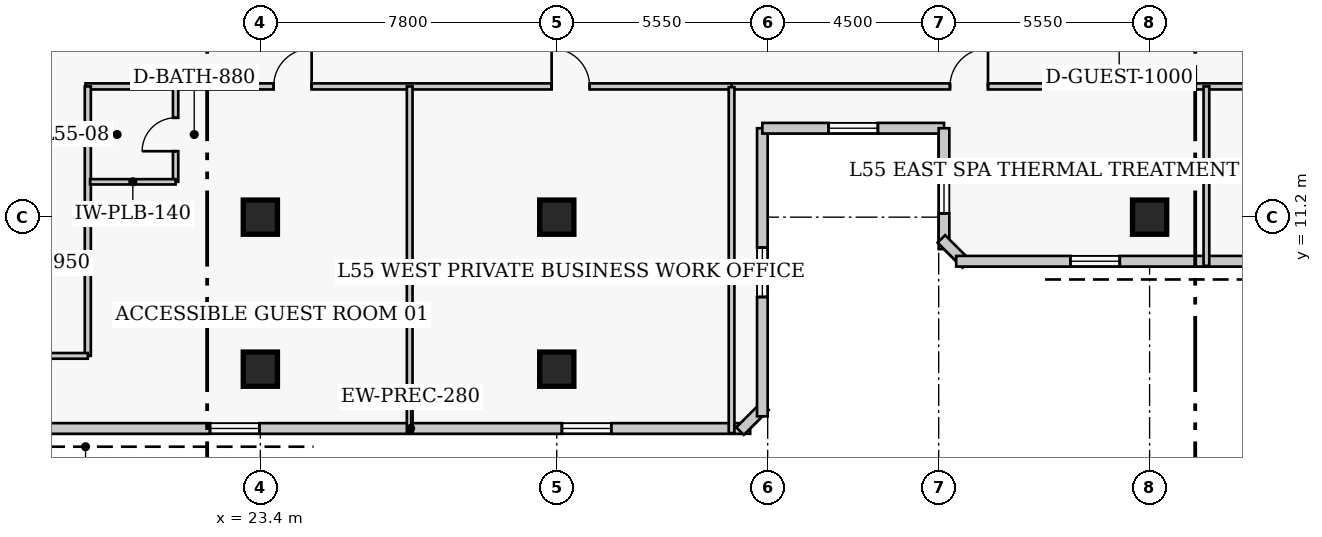
"""IFC4 building model, lengths in metres.
Left out: names, types, materials, properties, quantities, classifications, styles, units other than length and angle.
Written with IfcOpenShell. Run it as: python <this file> out.ifc"""

import sys

from ifc_helpers import new_model, si_unit, direction, frame, frame_2d, origin, origin_2d, place, context, subcontext, project, spatial, rectangle, extrude, element, fill, save


model = new_model("IFC4")
c1 = context("Model", 3, precision=1e-05, world=origin(), true_north=direction((0.0, 1.0)))
c2 = subcontext(c1, "Body", "Model", "MODEL_VIEW")
j1 = project(units=[si_unit("LENGTHUNIT", "METRE"), si_unit("PLANEANGLEUNIT", "RADIAN")], contexts=[c1])
p1 = place(None, origin())
s1 = spatial("IfcSite", under=j1, at=p1, CompositionType="ELEMENT")
p2 = place(p1, origin())
s2 = spatial("IfcBuilding", under=s1, at=p2, CompositionType="ELEMENT")
p3 = place(p2, frame((0.0, 0.0, 220.2)))
s3 = spatial("IfcBuildingStorey", under=s2, at=p3, CompositionType="ELEMENT", Elevation=220.2)
for number, where, z_axis, x_axis in (
    (1, (23.4, 11.2, 0.0), (0.0, 0.0, 1.0), (1.0, 0.0, 0.0)),
    (2, (31.2, 11.2, 0.0), (0.0, 0.0, 1.0), (1.0, 0.0, 0.0)),
    (3, (46.8, 11.2, 0.0), (0.0, 0.0, 1.0), (1.0, 0.0, 0.0)),
    (4, (23.4, 7.2, 0.0), (0.0, 0.0, 1.0), (1.0, 0.0, 0.0)),
    (5, (31.2, 7.2, 0.0), (0.0, 0.0, 1.0), (1.0, 0.0, 0.0)),
):
    element("IfcColumn", number, at=place(p3, frame(where, z_axis=z_axis, x_axis=x_axis)), inside=s3, PredefinedType="COLUMN", context=c2, shape_type="SweptSolid", body=[
        extrude(rectangle(XDim=0.9, YDim=0.9, at=origin_2d()), origin(), (0.0, 0.0, 1.0), 3.9),
    ])
p4 = place(p3, frame((10.46, 5.64, 0.0), z_axis=(0.0, 0.0, 1.0), x_axis=(1.0, 0.0, 0.0)))
e6 = element("IfcWall", 6, at=p4, inside=s3, PredefinedType="SOLIDWALL", context=c2, shape_type="SweptSolid", body=[
    extrude(rectangle(XDim=25.83, YDim=0.28, at=frame_2d((12.915, 0.0))), origin(), (0.0, 0.0, 1.0), 3.65),
])
p5 = place(p4, frame((4.305, 0.0, 0.85)))
e7 = element("IfcOpeningElement", 7, at=p5, cuts=e6, PredefinedType="OPENING", context=c2, shape_type="SweptSolid", body=[
    extrude(rectangle(XDim=1.3, YDim=1.7, at=frame_2d((0.65, 0.85))), frame((0.0, 0.15, 0.0), z_axis=(0.0, -1.0, 0.0), x_axis=(1.0, 0.0, 0.0)), (0.0, 0.0, 1.0), 0.3),
])
p6 = place(p4, frame((11.615, 0.0, 0.85)))
e8 = element("IfcOpeningElement", 8, at=p6, cuts=e6, PredefinedType="OPENING", context=c2, shape_type="SweptSolid", body=[
    extrude(rectangle(XDim=1.3, YDim=1.7, at=frame_2d((0.65, 0.85))), frame((0.0, 0.15, 0.0), z_axis=(0.0, -1.0, 0.0), x_axis=(1.0, 0.0, 0.0)), (0.0, 0.0, 1.0), 0.3),
])
p7 = place(p4, frame((20.875, 0.0, 0.85)))
e9 = element("IfcOpeningElement", 9, at=p7, cuts=e6, PredefinedType="OPENING", context=c2, shape_type="SweptSolid", body=[
    extrude(rectangle(XDim=1.3, YDim=1.7, at=frame_2d((0.65, 0.85))), frame((0.0, 0.15, 0.0), z_axis=(0.0, -1.0, 0.0), x_axis=(1.0, 0.0, 0.0)), (0.0, 0.0, 1.0), 0.3),
])
p8 = place(p3, frame((36.023, 5.571, 0.0), z_axis=(0.0, 0.0, 1.0), x_axis=(0.707106781187, 0.707106781187, 0.0)))
e10 = element("IfcWall", 10, at=p8, inside=s3, PredefinedType="SOLIDWALL", context=c2, shape_type="SweptSolid", body=[
    extrude(rectangle(XDim=0.928, YDim=0.28, at=frame_2d((0.464, 0.0))), origin(), (0.0, 0.0, 1.0), 3.65),
])
p9 = place(p3, frame((36.61, 5.96, 0.0), z_axis=(0.0, 0.0, 1.0), x_axis=(0.0, 1.0, 0.0)))
e11 = element("IfcWall", 11, at=p9, inside=s3, PredefinedType="SOLIDWALL", context=c2, shape_type="SweptSolid", body=[
    extrude(rectangle(XDim=7.58, YDim=0.28, at=frame_2d((3.79, 0.0))), origin(), (0.0, 0.0, 1.0), 3.65),
])
p10 = place(p9, frame((3.14, 0.0, 0.85)))
e12 = element("IfcOpeningElement", 12, at=p10, cuts=e11, PredefinedType="OPENING", context=c2, shape_type="SweptSolid", body=[
    extrude(rectangle(XDim=1.3, YDim=1.7, at=frame_2d((0.65, 0.85))), frame((0.0, 0.15, 0.0), z_axis=(0.0, -1.0, 0.0), x_axis=(1.0, 0.0, 0.0)), (0.0, 0.0, 1.0), 0.3),
])
p11 = place(p3, frame((36.61, 13.54, 0.0), z_axis=(0.0, 0.0, 1.0), x_axis=(1.0, 0.0, 0.0)))
e13 = element("IfcWall", 13, at=p11, inside=s3, PredefinedType="SOLIDWALL", context=c2, shape_type="SweptSolid", body=[
    extrude(rectangle(XDim=4.78, YDim=0.28, at=frame_2d((2.39, 0.0))), origin(), (0.0, 0.0, 1.0), 3.65),
])
p12 = place(p11, frame((1.74, 0.0, 0.85)))
e14 = element("IfcOpeningElement", 14, at=p12, cuts=e13, PredefinedType="OPENING", context=c2, shape_type="SweptSolid", body=[
    extrude(rectangle(XDim=1.3, YDim=1.7, at=frame_2d((0.65, 0.85))), frame((0.0, 0.15, 0.0), z_axis=(0.0, -1.0, 0.0), x_axis=(1.0, 0.0, 0.0)), (0.0, 0.0, 1.0), 0.3),
])
p13 = place(p3, frame((41.39, 13.54, 0.0), z_axis=(0.0, 0.0, 1.0), x_axis=(0.0, -1.0, 0.0)))
e15 = element("IfcWall", 15, at=p13, inside=s3, PredefinedType="SOLIDWALL", context=c2, shape_type="SweptSolid", body=[
    extrude(rectangle(XDim=3.18, YDim=0.28, at=frame_2d((1.59, 0.0))), origin(), (0.0, 0.0, 1.0), 3.65),
])
p14 = place(p13, frame((0.94, 0.0, 0.85)))
e16 = element("IfcOpeningElement", 16, at=p14, cuts=e15, PredefinedType="OPENING", context=c2, shape_type="SweptSolid", body=[
    extrude(rectangle(XDim=1.3, YDim=1.7, at=frame_2d((0.65, 0.85))), frame((0.0, 0.15, 0.0), z_axis=(0.0, -1.0, 0.0), x_axis=(1.0, 0.0, 0.0)), (0.0, 0.0, 1.0), 0.3),
])
p15 = place(p3, frame((41.321, 10.627, 0.0), z_axis=(0.0, 0.0, 1.0), x_axis=(0.707106781187, -0.707106781187, 0.0)))
e17 = element("IfcWall", 17, at=p15, inside=s3, PredefinedType="SOLIDWALL", context=c2, shape_type="SweptSolid", body=[
    extrude(rectangle(XDim=0.928, YDim=0.28, at=frame_2d((0.464, 0.0))), origin(), (0.0, 0.0, 1.0), 3.65),
])
p16 = place(p3, frame((41.71, 10.04, 0.0), z_axis=(0.0, 0.0, 1.0), x_axis=(1.0, 0.0, 0.0)))
e18 = element("IfcWall", 18, at=p16, inside=s3, PredefinedType="SOLIDWALL", context=c2, shape_type="SweptSolid", body=[
    extrude(rectangle(XDim=25.83, YDim=0.28, at=frame_2d((12.915, 0.0))), origin(), (0.0, 0.0, 1.0), 3.65),
])
p17 = place(p16, frame((3.005, 0.0, 0.85)))
e19 = element("IfcOpeningElement", 19, at=p17, cuts=e18, PredefinedType="OPENING", context=c2, shape_type="SweptSolid", body=[
    extrude(rectangle(XDim=1.3, YDim=1.7, at=frame_2d((0.65, 0.85))), frame((0.0, 0.15, 0.0), z_axis=(0.0, -1.0, 0.0), x_axis=(1.0, 0.0, 0.0)), (0.0, 0.0, 1.0), 0.3),
])
p18 = place(p16, frame((13.415, 0.0, 0.85)))
e20 = element("IfcOpeningElement", 20, at=p18, cuts=e18, PredefinedType="OPENING", context=c2, shape_type="SweptSolid", body=[
    extrude(rectangle(XDim=1.3, YDim=1.7, at=frame_2d((0.65, 0.85))), frame((0.0, 0.15, 0.0), z_axis=(0.0, -1.0, 0.0), x_axis=(1.0, 0.0, 0.0)), (0.0, 0.0, 1.0), 0.3),
])
p19 = place(p16, frame((21.525, 0.0, 0.85)))
e21 = element("IfcOpeningElement", 21, at=p19, cuts=e18, PredefinedType="OPENING", context=c2, shape_type="SweptSolid", body=[
    extrude(rectangle(XDim=1.3, YDim=1.7, at=frame_2d((0.65, 0.85))), frame((0.0, 0.15, 0.0), z_axis=(0.0, -1.0, 0.0), x_axis=(1.0, 0.0, 0.0)), (0.0, 0.0, 1.0), 0.3),
])
p20 = place(p3, frame((18.8, 14.64, 0.0), z_axis=(0.0, 0.0, 1.0), x_axis=(1.0, 0.0, 0.0)))
e22 = element("IfcWall", 22, at=p20, inside=s3, PredefinedType="PARTITIONING", context=c2, shape_type="SweptSolid", body=[
    extrude(rectangle(XDim=17.0, YDim=0.16, at=frame_2d((8.5, 0.0))), origin(), (0.0, 0.0, 1.0), 3.65),
])
p21 = place(p20, frame((4.95, 0.0, 0.0)))
e23 = element("IfcOpeningElement", 23, at=p21, cuts=e22, PredefinedType="OPENING", context=c2, shape_type="SweptSolid", body=[
    extrude(rectangle(XDim=1.0, YDim=2.15, at=frame_2d((0.5, 1.075))), frame((0.0, 0.09, 0.0), z_axis=(0.0, -1.0, 0.0), x_axis=(1.0, 0.0, 0.0)), (0.0, 0.0, 1.0), 0.18),
])
p22 = place(p20, frame((12.265, 0.0, 0.0)))
e24 = element("IfcOpeningElement", 24, at=p22, cuts=e22, PredefinedType="OPENING", context=c2, shape_type="SweptSolid", body=[
    extrude(rectangle(XDim=1.0, YDim=2.15, at=frame_2d((0.5, 1.075))), frame((0.0, 0.09, 0.0), z_axis=(0.0, -1.0, 0.0), x_axis=(1.0, 0.0, 0.0)), (0.0, 0.0, 1.0), 0.18),
])
p23 = place(p3, frame((35.8, 14.64, 0.0), z_axis=(0.0, 0.0, 1.0), x_axis=(1.0, 0.0, 0.0)))
e25 = element("IfcWall", 25, at=p23, inside=s3, PredefinedType="PARTITIONING", context=c2, shape_type="SweptSolid", body=[
    extrude(rectangle(XDim=22.85, YDim=0.16, at=frame_2d((11.425, 0.0))), origin(), (0.0, 0.0, 1.0), 3.65),
])
p24 = place(p23, frame((5.748, 0.0, 0.0)))
e26 = element("IfcOpeningElement", 26, at=p24, cuts=e25, PredefinedType="OPENING", context=c2, shape_type="SweptSolid", body=[
    extrude(rectangle(XDim=1.0, YDim=2.15, at=frame_2d((0.5, 1.075))), frame((0.0, 0.09, 0.0), z_axis=(0.0, -1.0, 0.0), x_axis=(1.0, 0.0, 0.0)), (0.0, 0.0, 1.0), 0.18),
])
p25 = place(p3, frame((18.86, 7.55, 0.0), z_axis=(0.0, 0.0, 1.0), x_axis=(0.0, 1.0, 0.0)))
e27 = element("IfcWall", 27, at=p25, inside=s3, PredefinedType="PARTITIONING", context=c2, shape_type="SweptSolid", body=[
    extrude(rectangle(XDim=7.09, YDim=0.16, at=frame_2d((3.545, 0.0))), origin(), (0.0, 0.0, 1.0), 3.65),
])
p26 = place(p3, frame((16.64, 7.55, 0.0), z_axis=(0.0, 0.0, 1.0), x_axis=(1.0, 0.0, 0.0)))
e28 = element("IfcWall", 28, at=p26, inside=s3, PredefinedType="PARTITIONING", context=c2, shape_type="SweptSolid", body=[
    extrude(rectangle(XDim=2.22, YDim=0.15, at=frame_2d((1.11, 0.0))), origin(), (0.0, 0.0, 1.0), 3.65),
])
p27 = place(p3, frame((21.17, 12.13, 0.0), z_axis=(0.0, 0.0, 1.0), x_axis=(0.0, 1.0, 0.0)))
e29 = element("IfcWall", 29, at=p27, inside=s3, PredefinedType="PLUMBINGWALL", context=c2, shape_type="SweptSolid", body=[
    extrude(rectangle(XDim=2.49, YDim=0.14, at=frame_2d((1.245, 0.0))), origin(), (0.0, 0.0, 1.0), 3.65),
])
p28 = place(p27, frame((0.805, 0.0, 0.0)))
e30 = element("IfcOpeningElement", 30, at=p28, cuts=e29, PredefinedType="OPENING", context=c2, shape_type="SweptSolid", body=[
    extrude(rectangle(XDim=0.88, YDim=2.05, at=frame_2d((0.44, 1.025))), frame((0.0, 0.08, 0.0), z_axis=(0.0, -1.0, 0.0), x_axis=(1.0, 0.0, 0.0)), (0.0, 0.0, 1.0), 0.16),
])
p29 = place(p3, frame((18.92, 12.13, 0.0), z_axis=(0.0, 0.0, 1.0), x_axis=(1.0, 0.0, 0.0)))
e31 = element("IfcWall", 31, at=p29, inside=s3, PredefinedType="PLUMBINGWALL", context=c2, shape_type="SweptSolid", body=[
    extrude(rectangle(XDim=2.25, YDim=0.14, at=frame_2d((1.125, 0.0))), origin(), (0.0, 0.0, 1.0), 3.65),
])
p30 = place(p3, frame((27.33, 5.52, 0.0), z_axis=(0.0, 0.0, 1.0), x_axis=(0.0, 1.0, 0.0)))
e32 = element("IfcWall", 32, at=p30, inside=s3, PredefinedType="PARTITIONING", context=c2, shape_type="SweptSolid", body=[
    extrude(rectangle(XDim=9.12, YDim=0.15, at=frame_2d((4.56, 0.0))), origin(), (0.0, 0.0, 1.0), 3.246),
])
p31 = place(p3, frame((35.8, 5.52, 0.0), z_axis=(0.0, 0.0, 1.0), x_axis=(0.0, 1.0, 0.0)))
e33 = element("IfcWall", 33, at=p31, inside=s3, PredefinedType="PARTITIONING", context=c2, shape_type="SweptSolid", body=[
    extrude(rectangle(XDim=9.1, YDim=0.15, at=frame_2d((4.55, 0.0))), origin(), (0.0, 0.0, 1.0), 3.65),
])
p32 = place(p3, frame((48.295, 9.92, 0.0), z_axis=(0.0, 0.0, 1.0), x_axis=(0.0, 1.0, 0.0)))
e34 = element("IfcWall", 34, at=p32, inside=s3, PredefinedType="PARTITIONING", context=c2, shape_type="SweptSolid", body=[
    extrude(rectangle(XDim=4.72, YDim=0.15, at=frame_2d((2.36, 0.0))), origin(), (0.0, 0.0, 1.0), 3.65),
])
p33 = place(p6, origin())
e35 = element("IfcWindow", 35, at=p33, inside=s3, PartitioningType="SINGLE_PANEL", PredefinedType="WINDOW", context=c2, shape_type="SweptSolid", body=[
    extrude(rectangle(XDim=1.3, YDim=1.7, at=frame_2d((0.65, 0.85))), frame((0.0, 0.03, 0.0), z_axis=(0.0, -1.0, 0.0), x_axis=(1.0, 0.0, 0.0)), (0.0, 0.0, 1.0), 0.06),
])
fill(e8, e35)
p34 = place(p7, origin())
e36 = element("IfcWindow", 36, at=p34, inside=s3, PartitioningType="SINGLE_PANEL", PredefinedType="WINDOW", context=c2, shape_type="SweptSolid", body=[
    extrude(rectangle(XDim=1.3, YDim=1.7, at=frame_2d((0.65, 0.85))), frame((0.0, 0.03, 0.0), z_axis=(0.0, -1.0, 0.0), x_axis=(1.0, 0.0, 0.0)), (0.0, 0.0, 1.0), 0.06),
])
fill(e9, e36)
p35 = place(p10, origin())
e37 = element("IfcWindow", 37, at=p35, inside=s3, PartitioningType="SINGLE_PANEL", PredefinedType="WINDOW", context=c2, shape_type="SweptSolid", body=[
    extrude(rectangle(XDim=1.3, YDim=1.7, at=frame_2d((0.65, 0.85))), frame((0.0, 0.03, 0.0), z_axis=(0.0, -1.0, 0.0), x_axis=(1.0, 0.0, 0.0)), (0.0, 0.0, 1.0), 0.06),
])
fill(e12, e37)
p36 = place(p12, origin())
e38 = element("IfcWindow", 38, at=p36, inside=s3, PartitioningType="SINGLE_PANEL", PredefinedType="WINDOW", context=c2, shape_type="SweptSolid", body=[
    extrude(rectangle(XDim=1.3, YDim=1.7, at=frame_2d((0.65, 0.85))), frame((0.0, 0.03, 0.0), z_axis=(0.0, -1.0, 0.0), x_axis=(1.0, 0.0, 0.0)), (0.0, 0.0, 1.0), 0.06),
])
fill(e14, e38)
p37 = place(p14, origin())
e39 = element("IfcWindow", 39, at=p37, inside=s3, PartitioningType="SINGLE_PANEL", PredefinedType="WINDOW", context=c2, shape_type="SweptSolid", body=[
    extrude(rectangle(XDim=1.3, YDim=1.7, at=frame_2d((0.65, 0.85))), frame((0.0, 0.03, 0.0), z_axis=(0.0, -1.0, 0.0), x_axis=(1.0, 0.0, 0.0)), (0.0, 0.0, 1.0), 0.06),
])
fill(e16, e39)
p38 = place(p17, origin())
e40 = element("IfcWindow", 40, at=p38, inside=s3, PartitioningType="SINGLE_PANEL", PredefinedType="WINDOW", context=c2, shape_type="SweptSolid", body=[
    extrude(rectangle(XDim=1.3, YDim=1.7, at=frame_2d((0.65, 0.85))), frame((0.0, 0.03, 0.0), z_axis=(0.0, -1.0, 0.0), x_axis=(1.0, 0.0, 0.0)), (0.0, 0.0, 1.0), 0.06),
])
fill(e19, e40)
p39 = place(p28, origin())
e41 = element("IfcDoor", 41, at=p39, inside=s3, OperationType="SINGLE_SWING_LEFT", PredefinedType="DOOR", context=c2, shape_type="SweptSolid", body=[
    extrude(rectangle(XDim=0.88, YDim=2.05, at=frame_2d((0.44, 1.025))), frame((0.0, 0.025, 0.0), z_axis=(0.0, -1.0, 0.0), x_axis=(1.0, 0.0, 0.0)), (0.0, 0.0, 1.0), 0.05),
])
fill(e30, e41)
p40 = place(p21, origin())
e42 = element("IfcDoor", 42, at=p40, inside=s3, OperationType="SINGLE_SWING_RIGHT", PredefinedType="DOOR", context=c2, shape_type="SweptSolid", body=[
    extrude(rectangle(XDim=1.0, YDim=2.15, at=frame_2d((0.5, 1.075))), frame((0.0, 0.025, 0.0), z_axis=(0.0, -1.0, 0.0), x_axis=(1.0, 0.0, 0.0)), (0.0, 0.0, 1.0), 0.05),
])
fill(e23, e42)
p41 = place(p22, origin())
e43 = element("IfcDoor", 43, at=p41, inside=s3, OperationType="SINGLE_SWING_LEFT", PredefinedType="DOOR", context=c2, shape_type="SweptSolid", body=[
    extrude(rectangle(XDim=1.0, YDim=2.15, at=frame_2d((0.5, 1.075))), frame((0.0, 0.025, 0.0), z_axis=(0.0, -1.0, 0.0), x_axis=(1.0, 0.0, 0.0)), (0.0, 0.0, 1.0), 0.05),
])
fill(e24, e43)
p42 = place(p24, origin())
e44 = element("IfcDoor", 44, at=p42, inside=s3, OperationType="SINGLE_SWING_RIGHT", PredefinedType="DOOR", context=c2, shape_type="SweptSolid", body=[
    extrude(rectangle(XDim=1.0, YDim=2.15, at=frame_2d((0.5, 1.075))), frame((0.0, 0.025, 0.0), z_axis=(0.0, -1.0, 0.0), x_axis=(1.0, 0.0, 0.0)), (0.0, 0.0, 1.0), 0.05),
])
fill(e26, e44)
save(model, sys.argv[1])
